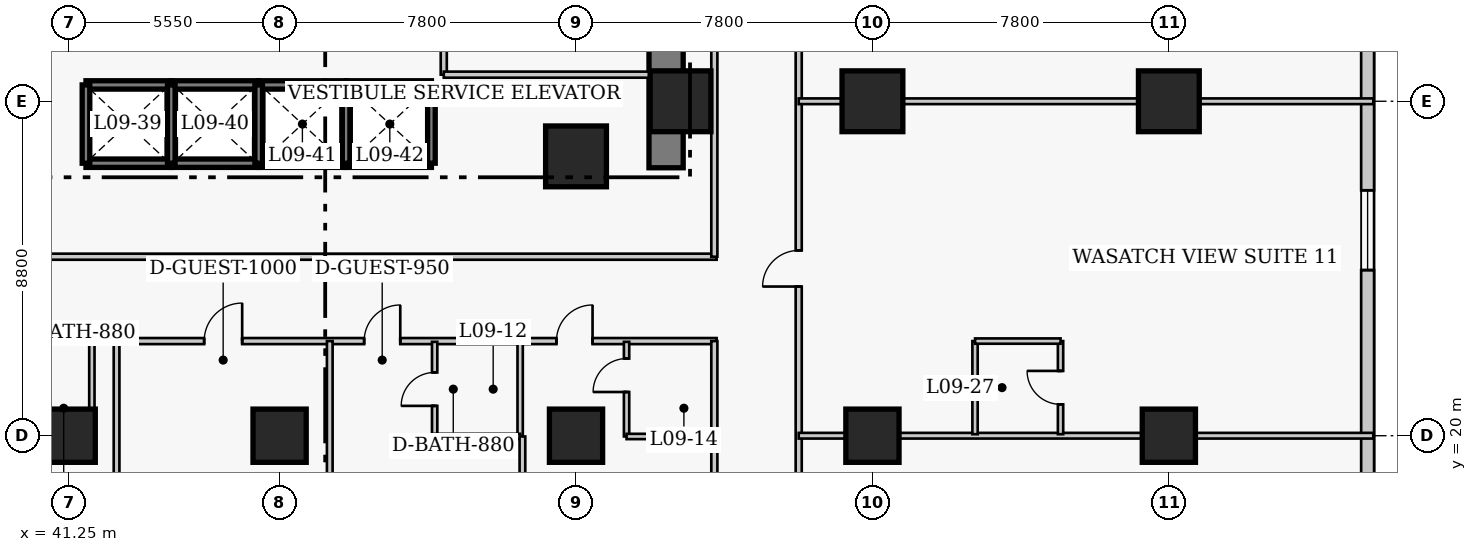
"""IFC4 building model, lengths in metres.
Left out: names, types, materials, properties, quantities, classifications, styles, units other than length and angle.
Written with IfcOpenShell. Run it as: python <this file> out.ifc"""

import sys

from ifc_helpers import new_model, si_unit, direction, frame, frame_2d, origin, origin_2d, place, context, subcontext, project, spatial, rectangle, extrude, element, fill, save


model = new_model("IFC4")
c1 = context("Model", 3, precision=1e-05, world=origin(), true_north=direction((0.0, 1.0)))
c2 = subcontext(c1, "Body", "Model", "MODEL_VIEW")
j1 = project(units=[si_unit("LENGTHUNIT", "METRE"), si_unit("PLANEANGLEUNIT", "RADIAN")], contexts=[c1])
p1 = place(None, origin())
s1 = spatial("IfcSite", under=j1, at=p1, CompositionType="ELEMENT")
p2 = place(p1, origin())
s2 = spatial("IfcBuilding", under=s1, at=p2, CompositionType="ELEMENT")
p3 = place(p2, frame((0.0, 0.0, 41.2)))
s3 = spatial("IfcBuildingStorey", under=s2, at=p3, CompositionType="ELEMENT", Elevation=41.2)
p4 = place(p3, frame((56.97, 27.05, 0.0), z_axis=(0.0, 0.0, 1.0), x_axis=(0.0, 1.0, 0.0)))
e1 = element("IfcWall", 1, at=p4, inside=s3, PredefinedType="SHEAR", context=c2, shape_type="SweptSolid", body=[
    extrude(rectangle(XDim=13.72, YDim=0.9, at=frame_2d((6.86, 0.0))), origin(), (0.0, 0.0, 1.0), 3.8),
])
for number, where, z_axis, x_axis in (
    (2, (41.25, 20.0, 0.0), (0.0, 0.0, 1.0), (1.0, 0.0, 0.0)),
    (3, (46.8, 20.0, 0.0), (0.0, 0.0, 1.0), (1.0, 0.0, 0.0)),
    (4, (54.6, 20.0, 0.0), (0.0, 0.0, 1.0), (1.0, 0.0, 0.0)),
    (5, (62.4, 20.0, 0.0), (0.0, 0.0, 1.0), (1.0, 0.0, 0.0)),
):
    element("IfcColumn", number, at=place(p3, frame(where, z_axis=z_axis, x_axis=x_axis)), inside=s3, PredefinedType="COLUMN", context=c2, shape_type="SweptSolid", body=[
        extrude(rectangle(XDim=1.4, YDim=1.4, at=origin_2d()), origin(), (0.0, 0.0, 1.0), 3.8),
    ])
p5 = place(p3, frame((62.4, 28.8, 0.0), z_axis=(0.0, 0.0, 1.0), x_axis=(1.0, 0.0, 0.0)))
e6 = element("IfcColumn", 6, at=p5, inside=s3, PredefinedType="COLUMN", context=c2, shape_type="SweptSolid", body=[
    extrude(rectangle(XDim=1.6, YDim=1.6, at=origin_2d()), origin(), (0.0, 0.0, 1.0), 3.8),
])
p6 = place(p3, frame((70.2, 20.0, 0.0), z_axis=(0.0, 0.0, 1.0), x_axis=(1.0, 0.0, 0.0)))
e7 = element("IfcColumn", 7, at=p6, inside=s3, PredefinedType="COLUMN", context=c2, shape_type="SweptSolid", body=[
    extrude(rectangle(XDim=1.4, YDim=1.4, at=origin_2d()), origin(), (0.0, 0.0, 1.0), 3.8),
])
for number, where, z_axis, x_axis in (
    (8, (70.2, 28.8, 0.0), (0.0, 0.0, 1.0), (1.0, 0.0, 0.0)),
    (9, (57.35, 28.8, 0.0), (0.0, 0.0, 1.0), (1.0, 0.0, 0.0)),
    (10, (54.6, 27.35, 0.0), (0.0, 0.0, 1.0), (1.0, 0.0, 0.0)),
):
    element("IfcColumn", number, at=place(p3, frame(where, z_axis=z_axis, x_axis=x_axis)), inside=s3, PredefinedType="COLUMN", context=c2, shape_type="SweptSolid", body=[
        extrude(rectangle(XDim=1.6, YDim=1.6, at=origin_2d()), origin(), (0.0, 0.0, 1.0), 3.8),
    ])
p7 = place(p3, frame((75.43, 12.23, 0.0), z_axis=(0.0, 0.0, 1.0), x_axis=(0.0, 1.0, 0.0)))
e11 = element("IfcWall", 11, at=p7, inside=s3, PredefinedType="SOLIDWALL", context=c2, shape_type="SweptSolid", body=[
    extrude(rectangle(XDim=35.14, YDim=0.34, at=frame_2d((17.57, 0.0))), origin(), (0.0, 0.0, 1.0), 3.54),
])
p8 = place(p7, frame((3.343, 0.0, 0.85)))
e12 = element("IfcOpeningElement", 12, at=p8, cuts=e11, PredefinedType="OPENING", context=c2, shape_type="SweptSolid", body=[
    extrude(rectangle(XDim=2.1, YDim=1.85, at=frame_2d((1.05, 0.925))), frame((0.0, 0.18, 0.0), z_axis=(0.0, -1.0, 0.0), x_axis=(1.0, 0.0, 0.0)), (0.0, 0.0, 1.0), 0.36),
])
p9 = place(p7, frame((12.127, 0.0, 0.85)))
e13 = element("IfcOpeningElement", 13, at=p9, cuts=e11, PredefinedType="OPENING", context=c2, shape_type="SweptSolid", body=[
    extrude(rectangle(XDim=2.1, YDim=1.85, at=frame_2d((1.05, 0.925))), frame((0.0, 0.18, 0.0), z_axis=(0.0, -1.0, 0.0), x_axis=(1.0, 0.0, 0.0)), (0.0, 0.0, 1.0), 0.36),
])
p10 = place(p7, frame((20.913, 0.0, 0.85)))
e14 = element("IfcOpeningElement", 14, at=p10, cuts=e11, PredefinedType="OPENING", context=c2, shape_type="SweptSolid", body=[
    extrude(rectangle(XDim=2.1, YDim=1.85, at=frame_2d((1.05, 0.925))), frame((0.0, 0.18, 0.0), z_axis=(0.0, -1.0, 0.0), x_axis=(1.0, 0.0, 0.0)), (0.0, 0.0, 1.0), 0.36),
])
p11 = place(p7, frame((29.698, 0.0, 0.85)))
e15 = element("IfcOpeningElement", 15, at=p11, cuts=e11, PredefinedType="OPENING", context=c2, shape_type="SweptSolid", body=[
    extrude(rectangle(XDim=2.1, YDim=1.85, at=frame_2d((1.05, 0.925))), frame((0.0, 0.18, 0.0), z_axis=(0.0, -1.0, 0.0), x_axis=(1.0, 0.0, 0.0)), (0.0, 0.0, 1.0), 0.36),
])
for number, where, z_axis, x_axis in (
    (16, (41.705, 29.23, 0.0), (0.0, 0.0, 1.0), (1.0, 0.0, 0.0)),
    (17, (41.705, 27.17, 0.0), (0.0, 0.0, 1.0), (1.0, 0.0, 0.0)),
):
    element("IfcWall", number, at=place(p3, frame(where, z_axis=z_axis, x_axis=x_axis)), inside=s3, PredefinedType="SHEAR", context=c2, shape_type="SweptSolid", body=[
        extrude(rectangle(XDim=2.245, YDim=0.22, at=frame_2d((1.123, 0.0))), origin(), (0.0, 0.0, 1.0), 3.8),
    ])
p12 = place(p3, frame((41.705, 27.17, 0.0), z_axis=(0.0, 0.0, 1.0), x_axis=(0.0, 1.0, 0.0)))
e18 = element("IfcWall", 18, at=p12, inside=s3, PredefinedType="SHEAR", context=c2, shape_type="SweptSolid", body=[
    extrude(rectangle(XDim=2.06, YDim=0.2, at=frame_2d((1.03, 0.0))), origin(), (0.0, 0.0, 1.0), 3.8),
])
for number, where, z_axis, x_axis in (
    (19, (43.95, 29.23, 0.0), (0.0, 0.0, 1.0), (1.0, 0.0, 0.0)),
    (20, (43.95, 27.17, 0.0), (0.0, 0.0, 1.0), (1.0, 0.0, 0.0)),
):
    element("IfcWall", number, at=place(p3, frame(where, z_axis=z_axis, x_axis=x_axis)), inside=s3, PredefinedType="SHEAR", context=c2, shape_type="SweptSolid", body=[
        extrude(rectangle(XDim=2.3, YDim=0.22, at=frame_2d((1.15, 0.0))), origin(), (0.0, 0.0, 1.0), 3.8),
    ])
p13 = place(p3, frame((43.95, 27.17, 0.0), z_axis=(0.0, 0.0, 1.0), x_axis=(0.0, 1.0, 0.0)))
e21 = element("IfcWall", 21, at=p13, inside=s3, PredefinedType="SHEAR", context=c2, shape_type="SweptSolid", body=[
    extrude(rectangle(XDim=2.06, YDim=0.2, at=frame_2d((1.03, 0.0))), origin(), (0.0, 0.0, 1.0), 3.8),
])
for number, where, z_axis, x_axis in (
    (22, (46.25, 29.23, 0.0), (0.0, 0.0, 1.0), (1.0, 0.0, 0.0)),
    (23, (46.25, 27.17, 0.0), (0.0, 0.0, 1.0), (1.0, 0.0, 0.0)),
):
    element("IfcWall", number, at=place(p3, frame(where, z_axis=z_axis, x_axis=x_axis)), inside=s3, PredefinedType="SHEAR", context=c2, shape_type="SweptSolid", body=[
        extrude(rectangle(XDim=2.3, YDim=0.22, at=frame_2d((1.15, 0.0))), origin(), (0.0, 0.0, 1.0), 3.8),
    ])
p14 = place(p3, frame((46.25, 27.17, 0.0), z_axis=(0.0, 0.0, 1.0), x_axis=(0.0, 1.0, 0.0)))
e24 = element("IfcWall", 24, at=p14, inside=s3, PredefinedType="SHEAR", context=c2, shape_type="SweptSolid", body=[
    extrude(rectangle(XDim=2.06, YDim=0.2, at=frame_2d((1.03, 0.0))), origin(), (0.0, 0.0, 1.0), 3.8),
])
for number, where, z_axis, x_axis in (
    (25, (48.55, 29.23, 0.0), (0.0, 0.0, 1.0), (1.0, 0.0, 0.0)),
    (26, (48.55, 27.17, 0.0), (0.0, 0.0, 1.0), (1.0, 0.0, 0.0)),
):
    element("IfcWall", number, at=place(p3, frame(where, z_axis=z_axis, x_axis=x_axis)), inside=s3, PredefinedType="SHEAR", context=c2, shape_type="SweptSolid", body=[
        extrude(rectangle(XDim=2.245, YDim=0.22, at=frame_2d((1.123, 0.0))), origin(), (0.0, 0.0, 1.0), 3.8),
    ])
for number, where, z_axis, x_axis in (
    (27, (48.55, 27.17, 0.0), (0.0, 0.0, 1.0), (0.0, 1.0, 0.0)),
    (28, (50.795, 27.17, 0.0), (0.0, 0.0, 1.0), (0.0, 1.0, 0.0)),
):
    element("IfcWall", number, at=place(p3, frame(where, z_axis=z_axis, x_axis=x_axis)), inside=s3, PredefinedType="SHEAR", context=c2, shape_type="SweptSolid", body=[
        extrude(rectangle(XDim=2.06, YDim=0.2, at=frame_2d((1.03, 0.0))), origin(), (0.0, 0.0, 1.0), 3.8),
    ])
p15 = place(p3, frame((51.12, 29.5, 0.0), z_axis=(0.0, 0.0, 1.0), x_axis=(0.0, 1.0, 0.0)))
e29 = element("IfcWall", 29, at=p15, inside=s3, PredefinedType="PARTITIONING", context=c2, shape_type="SweptSolid", body=[
    extrude(rectangle(XDim=3.7, YDim=0.16, at=frame_2d((1.85, 0.0))), origin(), (0.0, 0.0, 1.0), 3.54),
])
p16 = place(p15, frame((0.9, 0.0, 0.0)))
e30 = element("IfcOpeningElement", 30, at=p16, cuts=e29, PredefinedType="OPENING", context=c2, shape_type="SweptSolid", body=[
    extrude(rectangle(XDim=1.1, YDim=2.15, at=frame_2d((0.55, 1.075))), frame((0.0, 0.09, 0.0), z_axis=(0.0, -1.0, 0.0), x_axis=(1.0, 0.0, 0.0)), (0.0, 0.0, 1.0), 0.18),
])
p17 = place(p3, frame((51.12, 29.5, 0.0), z_axis=(0.0, 0.0, 1.0), x_axis=(1.0, 0.0, 0.0)))
e31 = element("IfcWall", 31, at=p17, inside=s3, PredefinedType="PARTITIONING", context=c2, shape_type="SweptSolid", body=[
    extrude(rectangle(XDim=5.63, YDim=0.16, at=frame_2d((2.815, 0.0))), origin(), (0.0, 0.0, 1.0), 3.54),
])
p18 = place(p3, frame((35.85, 24.71, 0.0), z_axis=(0.0, 0.0, 1.0), x_axis=(1.0, 0.0, 0.0)))
e32 = element("IfcWall", 32, at=p18, inside=s3, PredefinedType="PARTITIONING", context=c2, shape_type="SweptSolid", body=[
    extrude(rectangle(XDim=22.45, YDim=0.16, at=frame_2d((11.225, 0.0))), origin(), (0.0, 0.0, 1.0), 3.54),
])
p19 = place(p3, frame((35.8, 22.49, 0.0), z_axis=(0.0, 0.0, 1.0), x_axis=(1.0, 0.0, 0.0)))
e33 = element("IfcWall", 33, at=p19, inside=s3, PredefinedType="PARTITIONING", context=c2, shape_type="SweptSolid", body=[
    extrude(rectangle(XDim=22.5, YDim=0.16, at=frame_2d((11.25, 0.0))), origin(), (0.0, 0.0, 1.0), 3.54),
])
p20 = place(p19, frame((1.43, 0.0, 0.0)))
e34 = element("IfcOpeningElement", 34, at=p20, cuts=e33, PredefinedType="OPENING", context=c2, shape_type="SweptSolid", body=[
    extrude(rectangle(XDim=0.95, YDim=2.1, at=frame_2d((0.475, 1.05))), frame((0.0, 0.09, 0.0), z_axis=(0.0, -1.0, 0.0), x_axis=(1.0, 0.0, 0.0)), (0.0, 0.0, 1.0), 0.18),
])
p21 = place(p19, frame((9.015, 0.0, 0.0)))
e35 = element("IfcOpeningElement", 35, at=p21, cuts=e33, PredefinedType="OPENING", context=c2, shape_type="SweptSolid", body=[
    extrude(rectangle(XDim=1.0, YDim=2.15, at=frame_2d((0.5, 1.075))), frame((0.0, 0.09, 0.0), z_axis=(0.0, -1.0, 0.0), x_axis=(1.0, 0.0, 0.0)), (0.0, 0.0, 1.0), 0.18),
])
p22 = place(p19, frame((13.225, 0.0, 0.0)))
e36 = element("IfcOpeningElement", 36, at=p22, cuts=e33, PredefinedType="OPENING", context=c2, shape_type="SweptSolid", body=[
    extrude(rectangle(XDim=0.95, YDim=2.1, at=frame_2d((0.475, 1.05))), frame((0.0, 0.09, 0.0), z_axis=(0.0, -1.0, 0.0), x_axis=(1.0, 0.0, 0.0)), (0.0, 0.0, 1.0), 0.18),
])
p23 = place(p19, frame((18.285, 0.0, 0.0)))
e37 = element("IfcOpeningElement", 37, at=p23, cuts=e33, PredefinedType="OPENING", context=c2, shape_type="SweptSolid", body=[
    extrude(rectangle(XDim=0.95, YDim=2.1, at=frame_2d((0.475, 1.05))), frame((0.0, 0.09, 0.0), z_axis=(0.0, -1.0, 0.0), x_axis=(1.0, 0.0, 0.0)), (0.0, 0.0, 1.0), 0.18),
])
p24 = place(p3, frame((60.46, 10.25, 0.0), z_axis=(0.0, 0.0, 1.0), x_axis=(0.0, 1.0, 0.0)))
e38 = element("IfcWall", 38, at=p24, inside=s3, PredefinedType="PARTITIONING", context=c2, shape_type="SweptSolid", body=[
    extrude(rectangle(XDim=30.4, YDim=0.16, at=frame_2d((15.2, 0.0))), origin(), (0.0, 0.0, 1.0), 3.54),
])
p25 = place(p24, frame((4.4, 0.0, 0.0)))
e39 = element("IfcOpeningElement", 39, at=p25, cuts=e38, PredefinedType="OPENING", context=c2, shape_type="SweptSolid", body=[
    extrude(rectangle(XDim=0.95, YDim=2.1, at=frame_2d((0.475, 1.05))), frame((0.0, 0.09, 0.0), z_axis=(0.0, -1.0, 0.0), x_axis=(1.0, 0.0, 0.0)), (0.0, 0.0, 1.0), 0.18),
])
p26 = place(p24, frame((13.675, 0.0, 0.0)))
e40 = element("IfcOpeningElement", 40, at=p26, cuts=e38, PredefinedType="OPENING", context=c2, shape_type="SweptSolid", body=[
    extrude(rectangle(XDim=0.95, YDim=2.1, at=frame_2d((0.475, 1.05))), frame((0.0, 0.09, 0.0), z_axis=(0.0, -1.0, 0.0), x_axis=(1.0, 0.0, 0.0)), (0.0, 0.0, 1.0), 0.18),
])
p27 = place(p24, frame((21.475, 0.0, 0.0)))
e41 = element("IfcOpeningElement", 41, at=p27, cuts=e38, PredefinedType="OPENING", context=c2, shape_type="SweptSolid", body=[
    extrude(rectangle(XDim=0.95, YDim=2.1, at=frame_2d((0.475, 1.05))), frame((0.0, 0.09, 0.0), z_axis=(0.0, -1.0, 0.0), x_axis=(1.0, 0.0, 0.0)), (0.0, 0.0, 1.0), 0.18),
])
p28 = place(p24, frame((25.9, 0.0, 0.0)))
e42 = element("IfcOpeningElement", 42, at=p28, cuts=e38, PredefinedType="OPENING", context=c2, shape_type="SweptSolid", body=[
    extrude(rectangle(XDim=1.0, YDim=2.15, at=frame_2d((0.5, 1.075))), frame((0.0, 0.09, 0.0), z_axis=(0.0, -1.0, 0.0), x_axis=(1.0, 0.0, 0.0)), (0.0, 0.0, 1.0), 0.18),
])
p29 = place(p3, frame((58.24, 24.71, 0.0), z_axis=(0.0, 0.0, 1.0), x_axis=(0.0, 1.0, 0.0)))
e43 = element("IfcWall", 43, at=p29, inside=s3, PredefinedType="PARTITIONING", context=c2, shape_type="SweptSolid", body=[
    extrude(rectangle(XDim=15.94, YDim=0.16, at=frame_2d((7.97, 0.0))), origin(), (0.0, 0.0, 1.0), 3.54),
])
p30 = place(p3, frame((58.24, 10.25, 0.0), z_axis=(0.0, 0.0, 1.0), x_axis=(0.0, 1.0, 0.0)))
e44 = element("IfcWall", 44, at=p30, inside=s3, PredefinedType="PARTITIONING", context=c2, shape_type="SweptSolid", body=[
    extrude(rectangle(XDim=12.24, YDim=0.16, at=frame_2d((6.12, 0.0))), origin(), (0.0, 0.0, 1.0), 3.54),
])
p31 = place(p3, frame((41.86, 19.98, 0.0), z_axis=(0.0, 0.0, 1.0), x_axis=(0.0, 1.0, 0.0)))
e45 = element("IfcWall", 45, at=p31, inside=s3, PredefinedType="PLUMBINGWALL", context=c2, shape_type="SweptSolid", body=[
    extrude(rectangle(XDim=2.49, YDim=0.14, at=frame_2d((1.245, 0.0))), origin(), (0.0, 0.0, 1.0), 3.54),
])
p32 = place(p3, frame((39.61, 19.98, 0.0), z_axis=(0.0, 0.0, 1.0), x_axis=(1.0, 0.0, 0.0)))
e46 = element("IfcWall", 46, at=p32, inside=s3, PredefinedType="PLUMBINGWALL", context=c2, shape_type="SweptSolid", body=[
    extrude(rectangle(XDim=2.25, YDim=0.14, at=frame_2d((1.125, 0.0))), origin(), (0.0, 0.0, 1.0), 2.593),
])
for number, where, z_axis, x_axis in (
    (47, (42.51, 8.22, 0.0), (0.0, 0.0, 1.0), (0.0, 1.0, 0.0)),
    (48, (48.12, 8.22, 0.0), (0.0, 0.0, 1.0), (0.0, 1.0, 0.0)),
):
    element("IfcWall", number, at=place(p3, frame(where, z_axis=z_axis, x_axis=x_axis)), inside=s3, PredefinedType="PARTITIONING", context=c2, shape_type="SweptSolid", body=[
        extrude(rectangle(XDim=14.27, YDim=0.15, at=frame_2d((7.135, 0.0))), origin(), (0.0, 0.0, 1.0), 3.54),
    ])
p33 = place(p3, frame((50.88, 19.98, 0.0), z_axis=(0.0, 0.0, 1.0), x_axis=(0.0, 1.0, 0.0)))
e49 = element("IfcWall", 49, at=p33, inside=s3, PredefinedType="PLUMBINGWALL", context=c2, shape_type="SweptSolid", body=[
    extrude(rectangle(XDim=2.49, YDim=0.14, at=frame_2d((1.245, 0.0))), origin(), (0.0, 0.0, 1.0), 3.54),
])
p34 = place(p33, frame((0.805, 0.0, 0.0)))
e50 = element("IfcOpeningElement", 50, at=p34, cuts=e49, PredefinedType="OPENING", context=c2, shape_type="SweptSolid", body=[
    extrude(rectangle(XDim=0.88, YDim=2.05, at=frame_2d((0.44, 1.025))), frame((0.0, 0.08, 0.0), z_axis=(0.0, -1.0, 0.0), x_axis=(1.0, 0.0, 0.0)), (0.0, 0.0, 1.0), 0.16),
])
p35 = place(p3, frame((53.13, 19.98, 0.0), z_axis=(0.0, 0.0, 1.0), x_axis=(0.0, 1.0, 0.0)))
e51 = element("IfcWall", 51, at=p35, inside=s3, PredefinedType="PLUMBINGWALL", context=c2, shape_type="SweptSolid", body=[
    extrude(rectangle(XDim=2.49, YDim=0.14, at=frame_2d((1.245, 0.0))), origin(), (0.0, 0.0, 1.0), 3.54),
])
p36 = place(p3, frame((50.88, 19.98, 0.0), z_axis=(0.0, 0.0, 1.0), x_axis=(1.0, 0.0, 0.0)))
e52 = element("IfcWall", 52, at=p36, inside=s3, PredefinedType="PLUMBINGWALL", context=c2, shape_type="SweptSolid", body=[
    extrude(rectangle(XDim=2.25, YDim=0.14, at=frame_2d((1.125, 0.0))), origin(), (0.0, 0.0, 1.0), 2.593),
])
p37 = place(p3, frame((53.19, 8.22, 0.0), z_axis=(0.0, 0.0, 1.0), x_axis=(0.0, 1.0, 0.0)))
e53 = element("IfcWall", 53, at=p37, inside=s3, PredefinedType="PARTITIONING", context=c2, shape_type="SweptSolid", body=[
    extrude(rectangle(XDim=11.76, YDim=0.15, at=frame_2d((5.88, 0.0))), origin(), (0.0, 0.0, 1.0), 3.54),
])
p38 = place(p3, frame((55.93, 19.98, 0.0), z_axis=(0.0, 0.0, 1.0), x_axis=(0.0, 1.0, 0.0)))
e54 = element("IfcWall", 54, at=p38, inside=s3, PredefinedType="PLUMBINGWALL", context=c2, shape_type="SweptSolid", body=[
    extrude(rectangle(XDim=2.49, YDim=0.14, at=frame_2d((1.245, 0.0))), origin(), (0.0, 0.0, 1.0), 3.54),
])
p39 = place(p38, frame((1.17, 0.0, 0.0)))
e55 = element("IfcOpeningElement", 55, at=p39, cuts=e54, PredefinedType="OPENING", context=c2, shape_type="SweptSolid", body=[
    extrude(rectangle(XDim=0.88, YDim=2.05, at=frame_2d((0.44, 1.025))), frame((0.0, 0.08, 0.0), z_axis=(0.0, -1.0, 0.0), x_axis=(1.0, 0.0, 0.0)), (0.0, 0.0, 1.0), 0.16),
])
p40 = place(p3, frame((55.93, 19.98, 0.0), z_axis=(0.0, 0.0, 1.0), x_axis=(1.0, 0.0, 0.0)))
e56 = element("IfcWall", 56, at=p40, inside=s3, PredefinedType="PLUMBINGWALL", context=c2, shape_type="SweptSolid", body=[
    extrude(rectangle(XDim=2.25, YDim=0.14, at=frame_2d((1.125, 0.0))), origin(), (0.0, 0.0, 1.0), 2.593),
])
p41 = place(p3, frame((60.46, 20.0, 0.0), z_axis=(0.0, 0.0, 1.0), x_axis=(1.0, 0.0, 0.0)))
e57 = element("IfcWall", 57, at=p41, inside=s3, PredefinedType="PARTITIONING", context=c2, shape_type="SweptSolid", body=[
    extrude(rectangle(XDim=15.12, YDim=0.15, at=frame_2d((7.56, 0.0))), origin(), (0.0, 0.0, 1.0), 2.593),
])
p42 = place(p3, frame((65.1, 20.04, 0.0), z_axis=(0.0, 0.0, 1.0), x_axis=(0.0, 1.0, 0.0)))
e58 = element("IfcWall", 58, at=p42, inside=s3, PredefinedType="PLUMBINGWALL", context=c2, shape_type="SweptSolid", body=[
    extrude(rectangle(XDim=2.45, YDim=0.14, at=frame_2d((1.225, 0.0))), origin(), (0.0, 0.0, 1.0), 3.54),
])
p43 = place(p3, frame((67.35, 20.04, 0.0), z_axis=(0.0, 0.0, 1.0), x_axis=(0.0, 1.0, 0.0)))
e59 = element("IfcWall", 59, at=p43, inside=s3, PredefinedType="PLUMBINGWALL", context=c2, shape_type="SweptSolid", body=[
    extrude(rectangle(XDim=2.45, YDim=0.14, at=frame_2d((1.225, 0.0))), origin(), (0.0, 0.0, 1.0), 3.54),
])
p44 = place(p43, frame((0.785, 0.0, 0.0)))
e60 = element("IfcOpeningElement", 60, at=p44, cuts=e59, PredefinedType="OPENING", context=c2, shape_type="SweptSolid", body=[
    extrude(rectangle(XDim=0.88, YDim=2.05, at=frame_2d((0.44, 1.025))), frame((0.0, 0.08, 0.0), z_axis=(0.0, -1.0, 0.0), x_axis=(1.0, 0.0, 0.0)), (0.0, 0.0, 1.0), 0.16),
])
p45 = place(p3, frame((65.1, 22.49, 0.0), z_axis=(0.0, 0.0, 1.0), x_axis=(1.0, 0.0, 0.0)))
e61 = element("IfcWall", 61, at=p45, inside=s3, PredefinedType="PLUMBINGWALL", context=c2, shape_type="SweptSolid", body=[
    extrude(rectangle(XDim=2.25, YDim=0.14, at=frame_2d((1.125, 0.0))), origin(), (0.0, 0.0, 1.0), 3.54),
])
p46 = place(p3, frame((60.46, 28.8, 0.0), z_axis=(0.0, 0.0, 1.0), x_axis=(1.0, 0.0, 0.0)))
e62 = element("IfcWall", 62, at=p46, inside=s3, PredefinedType="PARTITIONING", context=c2, shape_type="SweptSolid", body=[
    extrude(rectangle(XDim=15.12, YDim=0.15, at=frame_2d((7.56, 0.0))), origin(), (0.0, 0.0, 1.0), 2.593),
])
p47 = place(p9, origin())
e63 = element("IfcWindow", 63, at=p47, inside=s3, PartitioningType="SINGLE_PANEL", PredefinedType="WINDOW", context=c2, shape_type="SweptSolid", body=[
    extrude(rectangle(XDim=2.1, YDim=1.85, at=frame_2d((1.05, 0.925))), frame((0.0, 0.03, 0.0), z_axis=(0.0, -1.0, 0.0), x_axis=(1.0, 0.0, 0.0)), (0.0, 0.0, 1.0), 0.06),
])
fill(e13, e63)
p48 = place(p21, origin())
e64 = element("IfcDoor", 64, at=p48, inside=s3, OperationType="SINGLE_SWING_RIGHT", PredefinedType="DOOR", context=c2, shape_type="SweptSolid", body=[
    extrude(rectangle(XDim=1.0, YDim=2.15, at=frame_2d((0.5, 1.075))), frame((0.0, 0.025, 0.0), z_axis=(0.0, -1.0, 0.0), x_axis=(1.0, 0.0, 0.0)), (0.0, 0.0, 1.0), 0.05),
])
fill(e35, e64)
p49 = place(p34, origin())
e65 = element("IfcDoor", 65, at=p49, inside=s3, OperationType="SINGLE_SWING_LEFT", PredefinedType="DOOR", context=c2, shape_type="SweptSolid", body=[
    extrude(rectangle(XDim=0.88, YDim=2.05, at=frame_2d((0.44, 1.025))), frame((0.0, 0.025, 0.0), z_axis=(0.0, -1.0, 0.0), x_axis=(1.0, 0.0, 0.0)), (0.0, 0.0, 1.0), 0.05),
])
fill(e50, e65)
p50 = place(p22, origin())
e66 = element("IfcDoor", 66, at=p50, inside=s3, OperationType="SINGLE_SWING_RIGHT", PredefinedType="DOOR", context=c2, shape_type="SweptSolid", body=[
    extrude(rectangle(XDim=0.95, YDim=2.1, at=frame_2d((0.475, 1.05))), frame((0.0, 0.025, 0.0), z_axis=(0.0, -1.0, 0.0), x_axis=(1.0, 0.0, 0.0)), (0.0, 0.0, 1.0), 0.05),
])
fill(e36, e66)
p51 = place(p39, origin())
e67 = element("IfcDoor", 67, at=p51, inside=s3, OperationType="SINGLE_SWING_LEFT", PredefinedType="DOOR", context=c2, shape_type="SweptSolid", body=[
    extrude(rectangle(XDim=0.88, YDim=2.05, at=frame_2d((0.44, 1.025))), frame((0.0, 0.025, 0.0), z_axis=(0.0, -1.0, 0.0), x_axis=(1.0, 0.0, 0.0)), (0.0, 0.0, 1.0), 0.05),
])
fill(e55, e67)
p52 = place(p23, origin())
e68 = element("IfcDoor", 68, at=p52, inside=s3, OperationType="SINGLE_SWING_RIGHT", PredefinedType="DOOR", context=c2, shape_type="SweptSolid", body=[
    extrude(rectangle(XDim=0.95, YDim=2.1, at=frame_2d((0.475, 1.05))), frame((0.0, 0.025, 0.0), z_axis=(0.0, -1.0, 0.0), x_axis=(1.0, 0.0, 0.0)), (0.0, 0.0, 1.0), 0.05),
])
fill(e37, e68)
p53 = place(p44, origin())
e69 = element("IfcDoor", 69, at=p53, inside=s3, OperationType="SINGLE_SWING_RIGHT", PredefinedType="DOOR", context=c2, shape_type="SweptSolid", body=[
    extrude(rectangle(XDim=0.88, YDim=2.05, at=frame_2d((0.44, 1.025))), frame((0.0, 0.025, 0.0), z_axis=(0.0, -1.0, 0.0), x_axis=(1.0, 0.0, 0.0)), (0.0, 0.0, 1.0), 0.05),
])
fill(e60, e69)
p54 = place(p26, origin())
e70 = element("IfcDoor", 70, at=p54, inside=s3, OperationType="SINGLE_SWING_LEFT", PredefinedType="DOOR", context=c2, shape_type="SweptSolid", body=[
    extrude(rectangle(XDim=0.95, YDim=2.1, at=frame_2d((0.475, 1.05))), frame((0.0, 0.025, 0.0), z_axis=(0.0, -1.0, 0.0), x_axis=(1.0, 0.0, 0.0)), (0.0, 0.0, 1.0), 0.05),
])
fill(e40, e70)
save(model, sys.argv[1])
